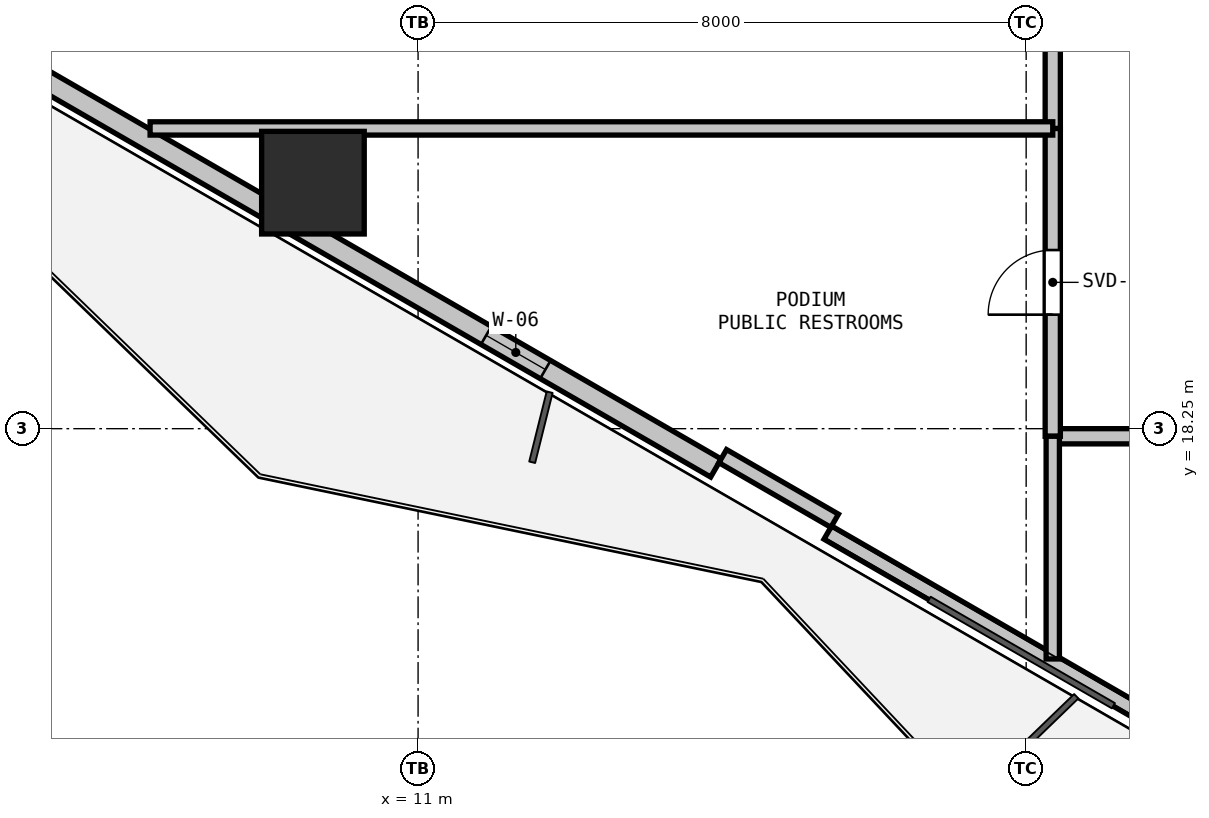
"""IFC4 building model, lengths in metres.
Left out: names, types, materials, properties, quantities, classifications, styles, units other than length and angle.
Written with IfcOpenShell. Run it as: python <this file> out.ifc"""

import sys

from ifc_helpers import new_model, si_unit, direction, frame, frame_2d, origin, origin_2d, place, context, subcontext, project, spatial, rectangle, hollow_rectangle, extrude, element, fill, save


model = new_model("IFC4")
c1 = context("Model", 3, precision=1e-05, world=origin(), true_north=direction((0.0, 1.0)))
c2 = subcontext(c1, "Body", "Model", "MODEL_VIEW")
j1 = project(units=[si_unit("LENGTHUNIT", "METRE"), si_unit("PLANEANGLEUNIT", "RADIAN")], contexts=[c1])
p1 = place(None, origin())
s1 = spatial("IfcSite", under=j1, at=p1, CompositionType="ELEMENT")
p2 = place(p1, origin())
s2 = spatial("IfcBuilding", under=s1, at=p2, CompositionType="ELEMENT")
p3 = place(p2, frame((0.0, 0.0, 19.2)))
s3 = spatial("IfcBuildingStorey", under=s2, at=p3, CompositionType="ELEMENT", Elevation=19.2)
p4 = place(p3, frame((9.617, 21.486, 0.0), z_axis=(0.0, 0.0, 1.0), x_axis=(1.0, 0.0, 0.0)))
e1 = element("IfcColumn", 1, at=p4, inside=s3, PredefinedType="COLUMN", context=c2, shape_type="SweptSolid", body=[
    extrude(hollow_rectangle(XDim=1.35, YDim=1.35, WallThickness=0.036, at=origin_2d()), origin(), (0.0, 0.0, 1.0), 3.3),
])
p5 = place(p3, frame((26.76, 10.896, 0.0), z_axis=(0.0, 0.0, 1.0), x_axis=(-0.866027351828, 0.499996625875, 0.0)))
e2 = element("IfcWall", 2, at=p5, inside=s3, PredefinedType="PARAPET", context=c2, shape_type="SweptSolid", body=[
    extrude(rectangle(XDim=11.973, YDim=0.2, at=frame_2d((5.987, 0.0))), origin(), (0.0, 0.0, 1.0), 0.2),
])
p6 = place(p3, frame((14.918, 17.733, 0.0), z_axis=(0.0, 0.0, 1.0), x_axis=(-0.866027105532, 0.499997052475, 0.0)))
e3 = element("IfcWall", 3, at=p6, inside=s3, PredefinedType="SOLIDWALL", context=c2, shape_type="SweptSolid", body=[
    extrude(rectangle(XDim=12.673, YDim=0.275, at=frame_2d((6.336, 0.0))), origin(), (0.0, 0.0, 1.0), 2.66),
])
p7 = place(p6, frame((2.59, 0.0, 0.9)))
e4 = element("IfcOpeningElement", 4, at=p7, cuts=e3, PredefinedType="OPENING", context=c2, shape_type="SweptSolid", body=[
    extrude(rectangle(XDim=0.9, YDim=1.4, at=frame_2d((0.45, 0.7))), frame((0.0, 0.147, 0.0), z_axis=(0.0, -1.0, 0.0), x_axis=(1.0, 0.0, 0.0)), (0.0, 0.0, 1.0), 0.295),
])
p8 = place(p3, frame((16.48, 17.039, 0.0), z_axis=(0.0, 0.0, 1.0), x_axis=(-0.86605165483, 0.499954529098, 0.0)))
e5 = element("IfcWall", 5, at=p8, inside=s3, PredefinedType="PARAPET", context=c2, shape_type="SweptSolid", body=[
    extrude(rectangle(XDim=1.7, YDim=0.2, at=frame_2d((0.85, 0.0))), origin(), (0.0, 0.0, 1.0), 2.66),
])
p9 = place(p3, frame((27.5, 18.15, 0.0), z_axis=(0.0, 0.0, 1.0), x_axis=(-1.0, 0.0, 0.0)))
e6 = element("IfcWall", 6, at=p9, inside=s3, PredefinedType="PARTITIONING", context=c2, shape_type="SweptSolid", body=[
    extrude(rectangle(XDim=8.15, YDim=0.2, at=frame_2d((4.075, 0.0))), origin(), (0.0, 0.0, 1.0), 2.338),
])
p10 = place(p9, frame((3.575, 0.0, 0.0)))
e7 = element("IfcOpeningElement", 7, at=p10, cuts=e6, PredefinedType="OPENING", context=c2, shape_type="SweptSolid", body=[
    extrude(rectangle(XDim=1.0, YDim=2.15, at=frame_2d((0.5, 1.075))), frame((0.0, 0.11, 0.0), z_axis=(0.0, -1.0, 0.0), x_axis=(1.0, 0.0, 0.0)), (0.0, 0.0, 1.0), 0.22),
])
p11 = place(p3, frame((19.35, 18.15, 0.0), z_axis=(0.0, 0.0, 1.0), x_axis=(0.0, 1.0, 0.0)))
e8 = element("IfcWall", 8, at=p11, inside=s3, PredefinedType="PARTITIONING", context=c2, shape_type="SweptSolid", body=[
    extrude(rectangle(XDim=4.05, YDim=0.2, at=frame_2d((2.025, 0.0))), origin(), (0.0, 0.0, 1.0), 2.338),
])
p12 = place(p11, frame((1.6, 0.0, 0.0)))
e9 = element("IfcOpeningElement", 9, at=p12, cuts=e8, PredefinedType="OPENING", context=c2, shape_type="SweptSolid", body=[
    extrude(rectangle(XDim=0.85, YDim=2.1, at=frame_2d((0.425, 1.05))), frame((0.0, 0.11, 0.0), z_axis=(0.0, -1.0, 0.0), x_axis=(1.0, 0.0, 0.0)), (0.0, 0.0, 1.0), 0.22),
])
p13 = place(p3, frame((19.35, 22.2, 0.0), z_axis=(0.0, 0.0, 1.0), x_axis=(0.0, 1.0, 0.0)))
e10 = element("IfcWall", 10, at=p13, inside=s3, PredefinedType="PARTITIONING", context=c2, shape_type="SweptSolid", body=[
    extrude(rectangle(XDim=3.2, YDim=0.2, at=frame_2d((1.6, 0.0))), origin(), (0.0, 0.0, 1.0), 3.04),
])
p14 = place(p3, frame((19.35, 18.15, 0.0), z_axis=(0.0, 0.0, 1.0), x_axis=(0.0, -1.0, 0.0)))
e11 = element("IfcWall", 11, at=p14, inside=s3, PredefinedType="PLUMBINGWALL", context=c2, shape_type="SweptSolid", body=[
    extrude(rectangle(XDim=2.93, YDim=0.175, at=frame_2d((1.465, 0.0))), origin(), (0.0, 0.0, 1.0), 2.365),
])
p15 = place(p3, frame((7.474, 22.2, 0.0), z_axis=(0.0, 0.0, 1.0), x_axis=(1.0, 0.0, 0.0)))
e12 = element("IfcWall", 12, at=p15, inside=s3, PredefinedType="PLUMBINGWALL", context=c2, shape_type="SweptSolid", body=[
    extrude(rectangle(XDim=11.876, YDim=0.175, at=frame_2d((5.938, 0.0))), origin(), (0.0, 0.0, 1.0), 2.338),
])
p16 = place(p7, origin())
e13 = element("IfcWindow", 13, at=p16, inside=s3, PartitioningType="SINGLE_PANEL", PredefinedType="WINDOW", context=c2, shape_type="SweptSolid", body=[
    extrude(rectangle(XDim=0.9, YDim=1.4, at=frame_2d((0.45, 0.7))), frame((0.0, 0.03, 0.0), z_axis=(0.0, -1.0, 0.0), x_axis=(1.0, 0.0, 0.0)), (0.0, 0.0, 1.0), 0.06),
])
fill(e4, e13)
p17 = place(p12, origin())
e14 = element("IfcDoor", 14, at=p17, inside=s3, OperationType="SINGLE_SWING_LEFT", PredefinedType="DOOR", context=c2, shape_type="SweptSolid", body=[
    extrude(rectangle(XDim=0.85, YDim=2.1, at=frame_2d((0.425, 1.05))), frame((0.0, 0.025, 0.0), z_axis=(0.0, -1.0, 0.0), x_axis=(1.0, 0.0, 0.0)), (0.0, 0.0, 1.0), 0.05),
])
fill(e9, e14)
save(model, sys.argv[1])
